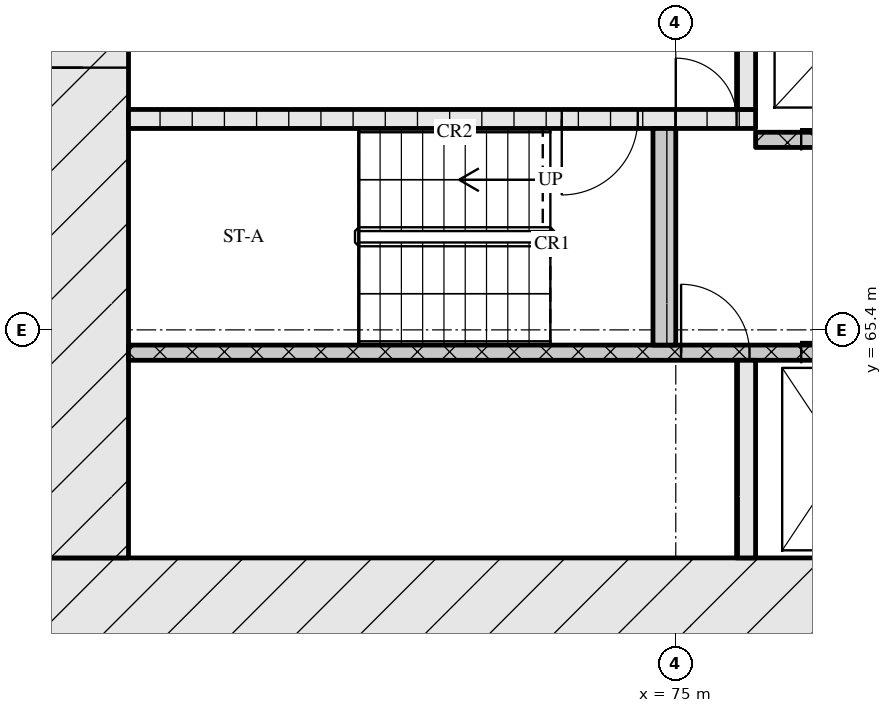
"""IFC4 building model, lengths in metres.
Left out: names, types, materials, properties, quantities, classifications, styles, units other than length and angle.
Written with IfcOpenShell. Run it as: python <this file> out.ifc"""

import sys

from ifc_helpers import new_model, si_unit, direction, frame, frame_2d, origin, place, context, subcontext, project, spatial, rectangle, extrude, element, fill, save


model = new_model("IFC4")
c1 = context("Model", 3, precision=1e-05, world=origin(), true_north=direction((0.0, 1.0)))
c2 = subcontext(c1, "Body", "Model", "MODEL_VIEW")
j1 = project(units=[si_unit("LENGTHUNIT", "METRE"), si_unit("PLANEANGLEUNIT", "RADIAN")], contexts=[c1])
p1 = place(None, origin())
s1 = spatial("IfcSite", under=j1, at=p1, CompositionType="ELEMENT")
p2 = place(p1, origin())
s2 = spatial("IfcBuilding", under=s1, at=p2, CompositionType="ELEMENT")
p3 = place(p2, frame((0.0, 0.0, 48.0)))
s3 = spatial("IfcBuildingStorey", under=s2, at=p3, CompositionType="ELEMENT", Elevation=48.0)
p4 = place(p3, frame((66.6, 61.8, 0.0), z_axis=(0.0, 0.0, 1.0), x_axis=(1.0, 0.0, 0.0)))
e1 = element("IfcWall", 1, at=p4, inside=s3, PredefinedType="SOLIDWALL", context=c2, shape_type="SweptSolid", body=[
    extrude(rectangle(XDim=42.0, YDim=1.2, at=frame_2d((21.0, 0.0))), origin(), (0.0, 0.0, 1.0), 3.32),
])
p5 = place(p4, frame((21.35, 0.0, 0.0)))
e2 = element("IfcOpeningElement", 2, at=p5, cuts=e1, PredefinedType="OPENING", context=c2, shape_type="SweptSolid", body=[
    extrude(rectangle(XDim=1.8, YDim=2.1, at=frame_2d((0.9, 1.05))), frame((0.0, 0.61, 0.0), z_axis=(0.0, -1.0, 0.0), x_axis=(1.0, 0.0, 0.0)), (0.0, 0.0, 1.0), 1.22),
])
p6 = place(p3, frame((67.2, 62.4, 0.0), z_axis=(0.0, 0.0, 1.0), x_axis=(0.0, 1.0, 0.0)))
e3 = element("IfcWall", 3, at=p6, inside=s3, PredefinedType="SOLIDWALL", context=c2, shape_type="SweptSolid", body=[
    extrude(rectangle(XDim=12.0, YDim=1.2, at=frame_2d((6.0, 0.0))), origin(), (0.0, 0.0, 1.0), 3.32),
])
p7 = place(p6, frame((6.45, 0.0, 0.0)))
e4 = element("IfcOpeningElement", 4, at=p7, cuts=e3, PredefinedType="OPENING", context=c2, shape_type="SweptSolid", body=[
    extrude(rectangle(XDim=1.2, YDim=2.1, at=frame_2d((0.6, 1.05))), frame((0.0, 0.61, 0.0), z_axis=(0.0, -1.0, 0.0), x_axis=(1.0, 0.0, 0.0)), (0.0, 0.0, 1.0), 1.22),
])
p8 = place(p3, frame((75.925, 62.4, 0.0), z_axis=(0.0, 0.0, 1.0), x_axis=(0.0, 1.0, 0.0)))
e5 = element("IfcWall", 5, at=p8, inside=s3, PredefinedType="SOLIDWALL", context=c2, shape_type="SweptSolid", body=[
    extrude(rectangle(XDim=2.6, YDim=0.25, at=frame_2d((1.3, 0.0))), origin(), (0.0, 0.0, 1.0), 3.32),
])
p9 = place(p3, frame((67.8, 65.1, 0.0), z_axis=(0.0, 0.0, 1.0), x_axis=(1.0, 0.0, 0.0)))
e6 = element("IfcWall", 6, at=p9, inside=s3, PredefinedType="SOLIDWALL", context=c2, shape_type="SweptSolid", body=[
    extrude(rectangle(XDim=18.5, YDim=0.2, at=frame_2d((9.25, 0.0))), origin(), (0.0, 0.0, 1.0), 3.32),
])
p10 = place(p9, frame((7.27, 0.0, 0.0)))
e7 = element("IfcOpeningElement", 7, at=p10, cuts=e6, PredefinedType="OPENING", context=c2, shape_type="SweptSolid", body=[
    extrude(rectangle(XDim=0.9, YDim=2.1, at=frame_2d((0.45, 1.05))), frame((0.0, 0.11, 0.0), z_axis=(0.0, -1.0, 0.0), x_axis=(1.0, 0.0, 0.0)), (0.0, 0.0, 1.0), 0.22),
])
p11 = place(p9, frame((8.85, 0.0, 0.0)))
e8 = element("IfcOpeningElement", 8, at=p11, cuts=e6, PredefinedType="OPENING", context=c2, shape_type="SweptSolid", body=[
    extrude(rectangle(XDim=1.1, YDim=2.1, at=frame_2d((0.55, 1.05))), frame((0.0, 0.11, 0.0), z_axis=(0.0, -1.0, 0.0), x_axis=(1.0, 0.0, 0.0)), (0.0, 0.0, 1.0), 0.22),
])
p12 = place(p9, frame((11.35, 0.0, 0.0)))
e9 = element("IfcOpeningElement", 9, at=p12, cuts=e6, PredefinedType="OPENING", context=c2, shape_type="SweptSolid", body=[
    extrude(rectangle(XDim=1.1, YDim=2.1, at=frame_2d((0.55, 1.05))), frame((0.0, 0.11, 0.0), z_axis=(0.0, -1.0, 0.0), x_axis=(1.0, 0.0, 0.0)), (0.0, 0.0, 1.0), 0.22),
])
p13 = place(p9, frame((13.85, 0.0, 0.0)))
e10 = element("IfcOpeningElement", 10, at=p13, cuts=e6, PredefinedType="OPENING", context=c2, shape_type="SweptSolid", body=[
    extrude(rectangle(XDim=1.1, YDim=2.1, at=frame_2d((0.55, 1.05))), frame((0.0, 0.11, 0.0), z_axis=(0.0, -1.0, 0.0), x_axis=(1.0, 0.0, 0.0)), (0.0, 0.0, 1.0), 0.22),
])
p14 = place(p9, frame((16.7, 0.0, 0.0)))
e11 = element("IfcOpeningElement", 11, at=p14, cuts=e6, PredefinedType="OPENING", context=c2, shape_type="SweptSolid", body=[
    extrude(rectangle(XDim=0.9, YDim=2.1, at=frame_2d((0.45, 1.05))), frame((0.0, 0.11, 0.0), z_axis=(0.0, -1.0, 0.0), x_axis=(1.0, 0.0, 0.0)), (0.0, 0.0, 1.0), 0.22),
])
p15 = place(p3, frame((74.85, 65.2, 0.0), z_axis=(0.0, 0.0, 1.0), x_axis=(0.0, 1.0, 0.0)))
e12 = element("IfcWall", 12, at=p15, inside=s3, PredefinedType="SOLIDWALL", context=c2, shape_type="SweptSolid", body=[
    extrude(rectangle(XDim=2.85, YDim=0.3, at=frame_2d((1.425, 0.0))), origin(), (0.0, 0.0, 1.0), 3.32),
])
p16 = place(p3, frame((76.05, 67.9, 0.0), z_axis=(0.0, 0.0, 1.0), x_axis=(1.0, 0.0, 0.0)))
e13 = element("IfcWall", 13, at=p16, inside=s3, PredefinedType="SOLIDWALL", context=c2, shape_type="SweptSolid", body=[
    extrude(rectangle(XDim=23.1, YDim=0.2, at=frame_2d((11.55, 0.0))), origin(), (0.0, 0.0, 1.0), 3.32),
])
p17 = place(p16, frame((0.6, 0.0, 0.0)))
e14 = element("IfcOpeningElement", 14, at=p17, cuts=e13, PredefinedType="OPENING", context=c2, shape_type="SweptSolid", body=[
    extrude(rectangle(XDim=1.1, YDim=2.1, at=frame_2d((0.55, 1.05))), frame((0.0, 0.11, 0.0), z_axis=(0.0, -1.0, 0.0), x_axis=(1.0, 0.0, 0.0)), (0.0, 0.0, 1.0), 0.22),
])
p18 = place(p16, frame((3.1, 0.0, 0.0)))
e15 = element("IfcOpeningElement", 15, at=p18, cuts=e13, PredefinedType="OPENING", context=c2, shape_type="SweptSolid", body=[
    extrude(rectangle(XDim=1.1, YDim=2.1, at=frame_2d((0.55, 1.05))), frame((0.0, 0.11, 0.0), z_axis=(0.0, -1.0, 0.0), x_axis=(1.0, 0.0, 0.0)), (0.0, 0.0, 1.0), 0.22),
])
p19 = place(p16, frame((5.6, 0.0, 0.0)))
e16 = element("IfcOpeningElement", 16, at=p19, cuts=e13, PredefinedType="OPENING", context=c2, shape_type="SweptSolid", body=[
    extrude(rectangle(XDim=1.1, YDim=2.1, at=frame_2d((0.55, 1.05))), frame((0.0, 0.11, 0.0), z_axis=(0.0, -1.0, 0.0), x_axis=(1.0, 0.0, 0.0)), (0.0, 0.0, 1.0), 0.22),
])
p20 = place(p16, frame((9.7, 0.0, 0.0)))
e17 = element("IfcOpeningElement", 17, at=p20, cuts=e13, PredefinedType="OPENING", context=c2, shape_type="SweptSolid", body=[
    extrude(rectangle(XDim=0.9, YDim=2.1, at=frame_2d((0.45, 1.05))), frame((0.0, 0.11, 0.0), z_axis=(0.0, -1.0, 0.0), x_axis=(1.0, 0.0, 0.0)), (0.0, 0.0, 1.0), 0.22),
])
p21 = place(p16, frame((13.55, 0.0, 0.0)))
e18 = element("IfcOpeningElement", 18, at=p21, cuts=e13, PredefinedType="OPENING", context=c2, shape_type="SweptSolid", body=[
    extrude(rectangle(XDim=1.0, YDim=2.1, at=frame_2d((0.5, 1.05))), frame((0.0, 0.11, 0.0), z_axis=(0.0, -1.0, 0.0), x_axis=(1.0, 0.0, 0.0)), (0.0, 0.0, 1.0), 0.22),
])
p22 = place(p3, frame((67.8, 68.175, 0.0), z_axis=(0.0, 0.0, 1.0), x_axis=(1.0, 0.0, 0.0)))
e19 = element("IfcWall", 19, at=p22, inside=s3, PredefinedType="SOLIDWALL", context=c2, shape_type="SweptSolid", body=[
    extrude(rectangle(XDim=8.25, YDim=0.25, at=frame_2d((4.125, 0.0))), origin(), (0.0, 0.0, 1.0), 3.32),
])
p23 = place(p22, frame((5.7, 0.0, 0.0)))
e20 = element("IfcOpeningElement", 20, at=p23, cuts=e19, PredefinedType="OPENING", context=c2, shape_type="SweptSolid", body=[
    extrude(rectangle(XDim=1.0, YDim=2.1, at=frame_2d((0.5, 1.05))), frame((0.0, 0.135, 0.0), z_axis=(0.0, -1.0, 0.0), x_axis=(1.0, 0.0, 0.0)), (0.0, 0.0, 1.0), 0.27),
])
p24 = place(p22, frame((7.2, 0.0, 0.0)))
e21 = element("IfcOpeningElement", 21, at=p24, cuts=e19, PredefinedType="OPENING", context=c2, shape_type="SweptSolid", body=[
    extrude(rectangle(XDim=0.8, YDim=2.1, at=frame_2d((0.4, 1.05))), frame((0.0, 0.135, 0.0), z_axis=(0.0, -1.0, 0.0), x_axis=(1.0, 0.0, 0.0)), (0.0, 0.0, 1.0), 0.27),
])
p25 = place(p3, frame((75.925, 68.3, 0.0), z_axis=(0.0, 0.0, 1.0), x_axis=(0.0, 1.0, 0.0)))
e22 = element("IfcWall", 22, at=p25, inside=s3, PredefinedType="SOLIDWALL", context=c2, shape_type="SweptSolid", body=[
    extrude(rectangle(XDim=2.3, YDim=0.25, at=frame_2d((1.15, 0.0))), origin(), (0.0, 0.0, 1.0), 3.32),
])
p26 = place(p10, origin())
e23 = element("IfcDoor", 23, at=p26, inside=s3, OperationType="SINGLE_SWING_LEFT", PredefinedType="DOOR", context=c2, shape_type="SweptSolid", body=[
    extrude(rectangle(XDim=0.9, YDim=2.1, at=frame_2d((0.45, 1.05))), frame((0.0, 0.025, 0.0), z_axis=(0.0, -1.0, 0.0), x_axis=(1.0, 0.0, 0.0)), (0.0, 0.0, 1.0), 0.05),
])
fill(e7, e23)
p27 = place(p11, origin())
e24 = element("IfcDoor", 24, at=p27, inside=s3, OperationType="SLIDING_TO_LEFT", PredefinedType="DOOR", context=c2, shape_type="SweptSolid", body=[
    extrude(rectangle(XDim=1.1, YDim=2.1, at=frame_2d((0.55, 1.05))), frame((0.0, 0.025, 0.0), z_axis=(0.0, -1.0, 0.0), x_axis=(1.0, 0.0, 0.0)), (0.0, 0.0, 1.0), 0.05),
])
fill(e8, e24)
p28 = place(p17, origin())
e25 = element("IfcDoor", 25, at=p28, inside=s3, OperationType="SLIDING_TO_RIGHT", PredefinedType="DOOR", context=c2, shape_type="SweptSolid", body=[
    extrude(rectangle(XDim=1.1, YDim=2.1, at=frame_2d((0.55, 1.05))), frame((0.0, 0.025, 0.0), z_axis=(0.0, -1.0, 0.0), x_axis=(1.0, 0.0, 0.0)), (0.0, 0.0, 1.0), 0.05),
])
fill(e14, e25)
p29 = place(p23, origin())
e26 = element("IfcDoor", 26, at=p29, inside=s3, OperationType="SINGLE_SWING_RIGHT", PredefinedType="DOOR", context=c2, shape_type="SweptSolid", body=[
    extrude(rectangle(XDim=1.0, YDim=2.1, at=frame_2d((0.5, 1.05))), frame((0.0, 0.025, 0.0), z_axis=(0.0, -1.0, 0.0), x_axis=(1.0, 0.0, 0.0)), (0.0, 0.0, 1.0), 0.05),
])
fill(e20, e26)
p30 = place(p24, origin())
e27 = element("IfcDoor", 27, at=p30, inside=s3, OperationType="SINGLE_SWING_LEFT", PredefinedType="DOOR", context=c2, shape_type="SweptSolid", body=[
    extrude(rectangle(XDim=0.8, YDim=2.1, at=frame_2d((0.4, 1.05))), frame((0.0, 0.025, 0.0), z_axis=(0.0, -1.0, 0.0), x_axis=(1.0, 0.0, 0.0)), (0.0, 0.0, 1.0), 0.05),
])
fill(e21, e27)
p31 = place(p7, origin())
e28 = element("IfcDoor", 28, at=p31, inside=s3, OperationType="SINGLE_SWING_LEFT", PredefinedType="DOOR", context=c2, shape_type="SweptSolid", body=[
    extrude(rectangle(XDim=1.2, YDim=2.1, at=frame_2d((0.6, 1.05))), frame((0.0, 0.025, 0.0), z_axis=(0.0, -1.0, 0.0), x_axis=(1.0, 0.0, 0.0)), (0.0, 0.0, 1.0), 0.05),
])
fill(e4, e28)
save(model, sys.argv[1])
